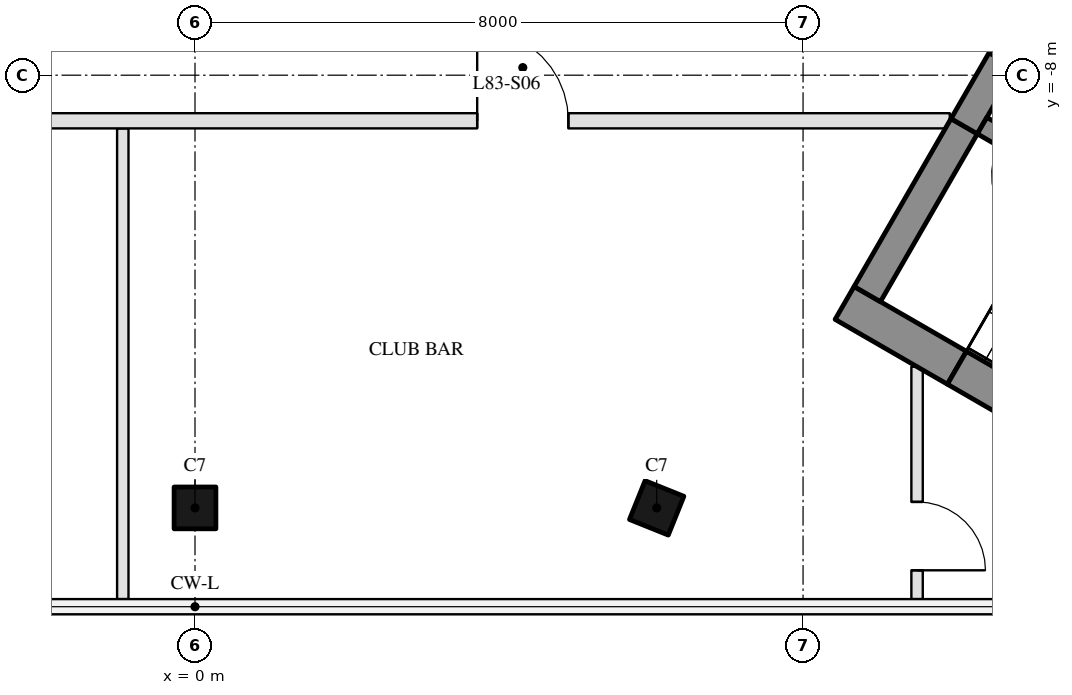
"""IFC4 building model, lengths in metres.
Left out: names, types, materials, properties, quantities, classifications, styles, units other than length and angle.
Written with IfcOpenShell. Run it as: python <this file> out.ifc"""

import sys

from ifc_helpers import new_model, si_unit, direction, frame, frame_2d, origin, origin_2d, place, context, subcontext, project, spatial, rectangle, hollow_rectangle, extrude, boolean, halfspace, element, fill, save


model = new_model("IFC4")
c1 = context("Model", 3, precision=1e-05, world=origin(), true_north=direction((0.0, 1.0)))
c2 = subcontext(c1, "Body", "Model", "MODEL_VIEW")
j1 = project(units=[si_unit("LENGTHUNIT", "METRE"), si_unit("PLANEANGLEUNIT", "RADIAN")], contexts=[c1])
p1 = place(None, origin())
s1 = spatial("IfcSite", under=j1, at=p1, CompositionType="ELEMENT")
p2 = place(p1, origin())
s2 = spatial("IfcBuilding", under=s1, at=p2, CompositionType="ELEMENT")
p3 = place(p2, frame((0.0, 0.0, 331.8)))
s3 = spatial("IfcBuildingStorey", under=s2, at=p3, CompositionType="ELEMENT", Elevation=331.8)
p4 = place(p3, frame((0.0, -13.693, 0.0), z_axis=(0.0, 0.086921865673, 0.996215132021), x_axis=(-1.0, 0.0, 0.0)))
e1 = element("IfcColumn", 1, at=p4, inside=s3, PredefinedType="COLUMN", context=c2, shape_type="SweptSolid", body=[
    boolean("DIFFERENCE", boolean("DIFFERENCE", extrude(hollow_rectangle(XDim=0.55, YDim=0.55, WallThickness=0.025, at=origin_2d()), origin(), (0.0, 0.0, 1.0), 6.525), halfspace(frame((0.0, 0.0, 0.015), z_axis=(0.0, 0.0, 1.0), x_axis=(1.0, 0.0, 0.0)), True)), halfspace(frame((0.0, 0.0, 6.506), z_axis=(0.0, 0.0, 1.0), x_axis=(1.0, 0.0, 0.0)), False)),
])
p5 = place(p3, frame((6.074, -13.693, 0.0), z_axis=(-0.034964378571, 0.086868718097, 0.99560600543), x_axis=(0.999387519863, 0.001602433283, 0.034957364729)))
e2 = element("IfcColumn", 2, at=p5, inside=s3, PredefinedType="COLUMN", context=c2, shape_type="SweptSolid", body=[
    boolean("DIFFERENCE", boolean("DIFFERENCE", extrude(hollow_rectangle(XDim=0.55, YDim=0.55, WallThickness=0.025, at=origin_2d()), origin(), (0.0, 0.0, 1.0), 6.529), halfspace(frame((0.0, 0.0, 0.016), z_axis=(0.0, 0.0, 1.0), x_axis=(1.0, 0.0, 0.0)), True)), halfspace(frame((0.0, 0.0, 6.509), z_axis=(0.0, 0.0, 1.0), x_axis=(1.0, 0.0, 0.0)), False)),
])
p6 = place(p3, frame((8.547, -10.997, 0.0), z_axis=(0.0, 0.0, 1.0), x_axis=(0.866033076574, -0.499986710104, 0.0)))
e3 = element("IfcWall", 3, at=p6, inside=s3, PredefinedType="SHEAR", context=c2, shape_type="SweptSolid", body=[
    extrude(rectangle(XDim=1.706, YDim=0.5, at=frame_2d((0.853, 0.0))), origin(), (0.0, 0.0, 1.0), 6.25),
])
p7 = place(p3, frame((10.024, -11.85, 0.0), z_axis=(0.0, 0.0, 1.0), x_axis=(0.866040105854, -0.499974534403, 0.0)))
e4 = element("IfcWall", 4, at=p7, inside=s3, PredefinedType="SHEAR", context=c2, shape_type="SweptSolid", body=[
    extrude(rectangle(XDim=1.705, YDim=0.5, at=frame_2d((0.852, 0.0))), origin(), (0.0, 0.0, 1.0), 6.25),
])
p8 = place(p3, frame((8.845, -10.88, 0.0), z_axis=(0.0, 0.0, 1.0), x_axis=(0.499990435942, 0.866030925526, 0.0)))
e5 = element("IfcWall", 5, at=p8, inside=s3, PredefinedType="SHEAR", context=c2, shape_type="SweptSolid", body=[
    extrude(rectangle(XDim=2.55, YDim=0.4, at=frame_2d((1.275, 0.0))), origin(), (0.0, 0.0, 1.0), 6.25),
])
p9 = place(p3, frame((10.12, -8.672, 0.0), z_axis=(0.0, 0.0, 1.0), x_axis=(0.500008956979, 0.866020232408, 0.0)))
e6 = element("IfcWall", 6, at=p9, inside=s3, PredefinedType="SHEAR", context=c2, shape_type="SweptSolid", body=[
    extrude(rectangle(XDim=7.45, YDim=0.4, at=frame_2d((3.725, 0.0))), origin(), (0.0, 0.0, 1.0), 6.25),
])
p10 = place(p9, frame((1.0, 0.0, 0.0)))
e7 = element("IfcOpeningElement", 7, at=p10, cuts=e6, PredefinedType="OPENING", context=c2, shape_type="SweptSolid", body=[
    extrude(rectangle(XDim=1.1, YDim=2.1, at=frame_2d((0.55, 1.05))), frame((0.0, 0.21, 0.0), z_axis=(0.0, -1.0, 0.0), x_axis=(1.0, 0.0, 0.0)), (0.0, 0.0, 1.0), 0.42),
])
p11 = place(p9, frame((3.3, 0.0, 0.0)))
e8 = element("IfcOpeningElement", 8, at=p11, cuts=e6, PredefinedType="OPENING", context=c2, shape_type="SweptSolid", body=[
    extrude(rectangle(XDim=1.4, YDim=2.1, at=frame_2d((0.7, 1.05))), frame((0.0, 0.21, 0.0), z_axis=(0.0, -1.0, 0.0), x_axis=(1.0, 0.0, 0.0)), (0.0, 0.0, 1.0), 0.42),
])
p12 = place(p3, frame((10.356, -8.664, 0.0), z_axis=(0.0, 0.0, 1.0), x_axis=(0.866095317631, -0.499878886109, 0.0)))
e9 = element("IfcWall", 9, at=p12, inside=s3, PredefinedType="SHEAR", context=c2, shape_type="SweptSolid", body=[
    extrude(rectangle(XDim=1.306, YDim=0.25, at=frame_2d((0.653, 0.0))), origin(), (0.0, 0.0, 1.0), 6.25),
])
p13 = place(p12, frame((0.3, 0.0, 0.0)))
e10 = element("IfcOpeningElement", 10, at=p13, cuts=e9, PredefinedType="OPENING", context=c2, shape_type="SweptSolid", body=[
    extrude(rectangle(XDim=1.0, YDim=2.1, at=frame_2d((0.5, 1.05))), frame((0.0, 0.135, 0.0), z_axis=(0.0, -1.0, 0.0), x_axis=(1.0, 0.0, 0.0)), (0.0, 0.0, 1.0), 0.27),
])
p14 = place(p3, frame((-0.95, -14.893, 0.0), z_axis=(0.0, 0.0, 1.0), x_axis=(0.0, 1.0, 0.0)))
e11 = element("IfcWall", 11, at=p14, inside=s3, PredefinedType="PARTITIONING", context=c2, shape_type="SweptSolid", body=[
    extrude(rectangle(XDim=6.193, YDim=0.15, at=frame_2d((3.097, 0.0))), origin(), (0.0, 0.0, 1.0), 5.85),
])
p15 = place(p3, frame((9.5, -14.893, 0.0), z_axis=(0.0, 0.0, 1.0), x_axis=(0.0, 1.0, 0.0)))
e12 = element("IfcWall", 12, at=p15, inside=s3, PredefinedType="PARTITIONING", context=c2, shape_type="SweptSolid", body=[
    extrude(rectangle(XDim=3.058, YDim=0.15, at=frame_2d((1.529, 0.0))), origin(), (0.0, 0.0, 1.0), 6.25),
])
p16 = place(p15, frame((0.379, 0.0, 0.0)))
e13 = element("IfcOpeningElement", 13, at=p16, cuts=e12, PredefinedType="OPENING", context=c2, shape_type="SweptSolid", body=[
    extrude(rectangle(XDim=0.9, YDim=2.1, at=frame_2d((0.45, 1.05))), frame((0.0, 0.085, 0.0), z_axis=(0.0, -1.0, 0.0), x_axis=(1.0, 0.0, 0.0)), (0.0, 0.0, 1.0), 0.17),
])
p17 = place(p3, frame((-9.93, -8.6, 0.0), z_axis=(0.0, 0.0, 1.0), x_axis=(1.0, 0.0, 0.0)))
e14 = element("IfcWall", 14, at=p17, inside=s3, PredefinedType="PARTITIONING", context=c2, shape_type="SweptSolid", body=[
    extrude(rectangle(XDim=19.861, YDim=0.2, at=frame_2d((9.93, 0.0))), origin(), (0.0, 0.0, 1.0), 5.85),
])
p18 = place(p17, frame((1.504, 0.0, 0.0)))
e15 = element("IfcOpeningElement", 15, at=p18, cuts=e14, PredefinedType="OPENING", context=c2, shape_type="SweptSolid", body=[
    extrude(rectangle(XDim=1.5, YDim=2.1, at=frame_2d((0.75, 1.05))), frame((0.0, 0.11, 0.0), z_axis=(0.0, -1.0, 0.0), x_axis=(1.0, 0.0, 0.0)), (0.0, 0.0, 1.0), 0.22),
])
p19 = place(p17, frame((6.013, 0.0, 0.0)))
e16 = element("IfcOpeningElement", 16, at=p19, cuts=e14, PredefinedType="OPENING", context=c2, shape_type="SweptSolid", body=[
    extrude(rectangle(XDim=1.5, YDim=2.1, at=frame_2d((0.75, 1.05))), frame((0.0, 0.11, 0.0), z_axis=(0.0, -1.0, 0.0), x_axis=(1.0, 0.0, 0.0)), (0.0, 0.0, 1.0), 0.22),
])
p20 = place(p17, frame((13.643, 0.0, 0.0)))
e17 = element("IfcOpeningElement", 17, at=p20, cuts=e14, PredefinedType="OPENING", context=c2, shape_type="SweptSolid", body=[
    extrude(rectangle(XDim=1.2, YDim=2.1, at=frame_2d((0.6, 1.05))), frame((0.0, 0.11, 0.0), z_axis=(0.0, -1.0, 0.0), x_axis=(1.0, 0.0, 0.0)), (0.0, 0.0, 1.0), 0.22),
])
p21 = place(p20, origin())
e18 = element("IfcDoor", 18, at=p21, inside=s3, OperationType="SINGLE_SWING_LEFT", PredefinedType="DOOR", context=c2, shape_type="SweptSolid", body=[
    extrude(rectangle(XDim=1.2, YDim=2.1, at=frame_2d((0.6, 1.05))), frame((0.0, 0.025, 0.0), z_axis=(0.0, -1.0, 0.0), x_axis=(1.0, 0.0, 0.0)), (0.0, 0.0, 1.0), 0.05),
])
fill(e17, e18)
p22 = place(p16, frame((0.9, 0.0, 0.0), z_axis=(0.0, 0.0, 1.0), x_axis=(-1.0, 0.0, 0.0)))
e19 = element("IfcDoor", 19, at=p22, inside=s3, OperationType="SINGLE_SWING_RIGHT", PredefinedType="DOOR", context=c2, shape_type="SweptSolid", body=[
    extrude(rectangle(XDim=0.9, YDim=2.1, at=frame_2d((0.45, 1.05))), frame((0.0, 0.025, 0.0), z_axis=(0.0, -1.0, 0.0), x_axis=(1.0, 0.0, 0.0)), (0.0, 0.0, 1.0), 0.05),
])
fill(e13, e19)
save(model, sys.argv[1])
